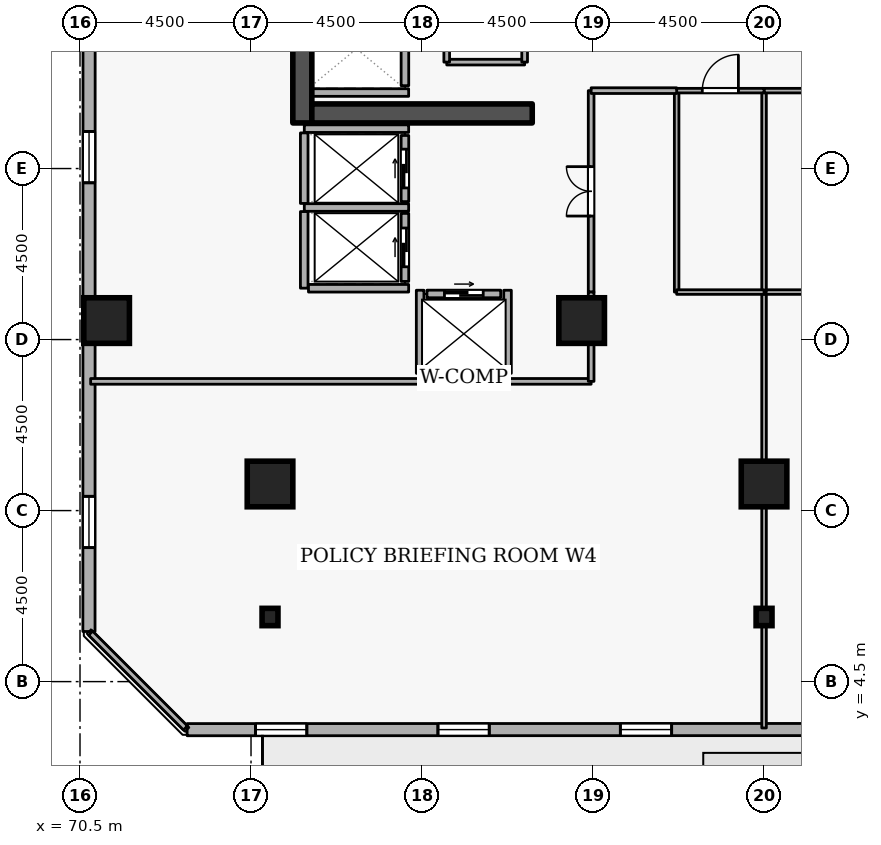
"""IFC4 building model, lengths in metres.
Left out: names, types, materials, properties, quantities, classifications, styles, units other than length and angle.
Written with IfcOpenShell. Run it as: python <this file> out.ifc"""

import sys

from ifc_helpers import new_model, si_unit, direction, frame, frame_2d, origin, origin_2d, place, context, subcontext, project, spatial, rectangle, i_section, extrude, element, fill, save


model = new_model("IFC4")
c1 = context("Model", 3, precision=1e-05, world=origin(), true_north=direction((0.0, 1.0)))
c2 = subcontext(c1, "Body", "Model", "MODEL_VIEW")
j1 = project(units=[si_unit("LENGTHUNIT", "METRE"), si_unit("PLANEANGLEUNIT", "RADIAN")], contexts=[c1])
p1 = place(None, origin())
s1 = spatial("IfcSite", under=j1, at=p1, CompositionType="ELEMENT")
p2 = place(p1, origin())
s2 = spatial("IfcBuilding", under=s1, at=p2, CompositionType="ELEMENT")
p3 = place(p2, frame((0.0, 0.0, 137.7)))
s3 = spatial("IfcBuildingStorey", under=s2, at=p3, CompositionType="ELEMENT", Elevation=137.7)
p4 = place(p3, frame((76.35, 19.2, 0.0), z_axis=(0.0, 0.0, 1.0), x_axis=(0.0, 1.0, 0.0)))
e1 = element("IfcWall", 1, at=p4, inside=s3, PredefinedType="SHEAR", context=c2, shape_type="SweptSolid", body=[
    extrude(rectangle(XDim=15.6, YDim=0.5, at=frame_2d((7.8, 0.0))), origin(), (0.0, 0.0, 1.0), 3.6),
])
p5 = place(p3, frame((76.6, 19.45, 0.0), z_axis=(0.0, 0.0, 1.0), x_axis=(1.0, 0.0, 0.0)))
e2 = element("IfcWall", 2, at=p5, inside=s3, PredefinedType="SHEAR", context=c2, shape_type="SweptSolid", body=[
    extrude(rectangle(XDim=5.8, YDim=0.5, at=frame_2d((2.9, 0.0))), origin(), (0.0, 0.0, 1.0), 3.6),
])
for number, where, z_axis, x_axis in (
    (3, (71.2, 14.0, 0.0), (0.0, 0.0, 1.0), (1.0, 0.0, 0.0)),
    (4, (88.5, 9.7, 0.0), (0.0, 0.0, 1.0), (1.0, 0.0, 0.0)),
    (5, (75.5, 9.7, 0.0), (0.0, 0.0, 1.0), (1.0, 0.0, 0.0)),
    (6, (83.7, 14.0, 0.0), (0.0, 0.0, 1.0), (1.0, 0.0, 0.0)),
):
    element("IfcColumn", number, at=place(p3, frame(where, z_axis=z_axis, x_axis=x_axis)), inside=s3, PredefinedType="COLUMN", context=c2, shape_type="SweptSolid", body=[
        extrude(rectangle(XDim=1.2, YDim=1.2, at=origin_2d()), origin(), (0.0, 0.0, 1.0), 3.6),
    ])
for number, where, z_axis, x_axis in (
    (7, (88.5, 6.2, 0.0), (0.0, 0.0, 1.0), (1.0, 0.0, 0.0)),
    (8, (75.5, 6.2, 0.0), (0.0, 0.0, 1.0), (1.0, 0.0, 0.0)),
):
    element("IfcColumn", number, at=place(p3, frame(where, z_axis=z_axis, x_axis=x_axis)), inside=s3, PredefinedType="COLUMN", context=c2, shape_type="SweptSolid", body=[
        extrude(i_section(OverallWidth=0.418, OverallDepth=0.456, WebThickness=0.042, FlangeThickness=0.067, FilletRadius=0.015, at=origin_2d()), origin(), (0.0, 0.0, 1.0), 3.6),
    ])
p6 = place(p3, frame((73.319, 3.235, 0.0), z_axis=(0.0, 0.0, 1.0), x_axis=(0.99999997701, 0.000214431216, 0.0)))
e9 = element("IfcWall", 9, at=p6, inside=s3, PredefinedType="STANDARD", context=c2, shape_type="SweptSolid", body=[
    extrude(rectangle(XDim=34.156, YDim=0.32, at=frame_2d((17.078, 0.0))), origin(), (0.0, 0.0, 1.0), 2.66),
])
p7 = place(p6, frame((18.878, 0.0, 0.0)))
e10 = element("IfcOpeningElement", 10, at=p7, cuts=e9, PredefinedType="OPENING", context=c2, shape_type="SweptSolid", body=[
    extrude(rectangle(XDim=1.0, YDim=2.08, at=frame_2d((0.5, 1.04))), frame((0.0, 0.17, 0.0), z_axis=(0.0, -1.0, 0.0), x_axis=(1.0, 0.0, 0.0)), (0.0, 0.0, 1.0), 0.34),
])
p8 = place(p6, frame((1.8, 0.0, 0.72)))
e11 = element("IfcOpeningElement", 11, at=p8, cuts=e9, PredefinedType="OPENING", context=c2, shape_type="SweptSolid", body=[
    extrude(rectangle(XDim=1.35, YDim=1.05, at=frame_2d((0.675, 0.525))), frame((0.0, 0.17, 0.0), z_axis=(0.0, -1.0, 0.0), x_axis=(1.0, 0.0, 0.0)), (0.0, 0.0, 1.0), 0.34),
])
p9 = place(p6, frame((6.6, 0.0, 0.72)))
e12 = element("IfcOpeningElement", 12, at=p9, cuts=e9, PredefinedType="OPENING", context=c2, shape_type="SweptSolid", body=[
    extrude(rectangle(XDim=1.35, YDim=1.05, at=frame_2d((0.675, 0.525))), frame((0.0, 0.17, 0.0), z_axis=(0.0, -1.0, 0.0), x_axis=(1.0, 0.0, 0.0)), (0.0, 0.0, 1.0), 0.34),
])
p10 = place(p6, frame((11.4, 0.0, 0.72)))
e13 = element("IfcOpeningElement", 13, at=p10, cuts=e9, PredefinedType="OPENING", context=c2, shape_type="SweptSolid", body=[
    extrude(rectangle(XDim=1.35, YDim=1.05, at=frame_2d((0.675, 0.525))), frame((0.0, 0.17, 0.0), z_axis=(0.0, -1.0, 0.0), x_axis=(1.0, 0.0, 0.0)), (0.0, 0.0, 1.0), 0.34),
])
p11 = place(p6, frame((16.2, 0.0, 0.72)))
e14 = element("IfcOpeningElement", 14, at=p11, cuts=e9, PredefinedType="OPENING", context=c2, shape_type="SweptSolid", body=[
    extrude(rectangle(XDim=1.35, YDim=1.05, at=frame_2d((0.675, 0.525))), frame((0.0, 0.17, 0.0), z_axis=(0.0, -1.0, 0.0), x_axis=(1.0, 0.0, 0.0)), (0.0, 0.0, 1.0), 0.34),
])
p12 = place(p6, frame((21.0, 0.0, 0.72)))
e15 = element("IfcOpeningElement", 15, at=p12, cuts=e9, PredefinedType="OPENING", context=c2, shape_type="SweptSolid", body=[
    extrude(rectangle(XDim=1.35, YDim=1.05, at=frame_2d((0.675, 0.525))), frame((0.0, 0.17, 0.0), z_axis=(0.0, -1.0, 0.0), x_axis=(1.0, 0.0, 0.0)), (0.0, 0.0, 1.0), 0.34),
])
p13 = place(p6, frame((25.8, 0.0, 0.72)))
e16 = element("IfcOpeningElement", 16, at=p13, cuts=e9, PredefinedType="OPENING", context=c2, shape_type="SweptSolid", body=[
    extrude(rectangle(XDim=1.35, YDim=1.05, at=frame_2d((0.675, 0.525))), frame((0.0, 0.17, 0.0), z_axis=(0.0, -1.0, 0.0), x_axis=(1.0, 0.0, 0.0)), (0.0, 0.0, 1.0), 0.34),
])
p14 = place(p6, frame((30.6, 0.0, 0.72)))
e17 = element("IfcOpeningElement", 17, at=p14, cuts=e9, PredefinedType="OPENING", context=c2, shape_type="SweptSolid", body=[
    extrude(rectangle(XDim=1.35, YDim=1.05, at=frame_2d((0.675, 0.525))), frame((0.0, 0.17, 0.0), z_axis=(0.0, -1.0, 0.0), x_axis=(1.0, 0.0, 0.0)), (0.0, 0.0, 1.0), 0.34),
])
p15 = place(p3, frame((70.743, 39.975, 0.0), z_axis=(0.0, 0.0, 1.0), x_axis=(-0.000214431216, -0.99999997701, 0.0)))
e18 = element("IfcWall", 18, at=p15, inside=s3, PredefinedType="STANDARD", context=c2, shape_type="SweptSolid", body=[
    extrude(rectangle(XDim=34.156, YDim=0.32, at=frame_2d((17.078, 0.0))), origin(), (0.0, 0.0, 1.0), 2.66),
])
p16 = place(p15, frame((6.6, 0.0, 0.72)))
e19 = element("IfcOpeningElement", 19, at=p16, cuts=e18, PredefinedType="OPENING", context=c2, shape_type="SweptSolid", body=[
    extrude(rectangle(XDim=1.35, YDim=1.05, at=frame_2d((0.675, 0.525))), frame((0.0, 0.17, 0.0), z_axis=(0.0, -1.0, 0.0), x_axis=(1.0, 0.0, 0.0)), (0.0, 0.0, 1.0), 0.34),
])
p17 = place(p15, frame((21.0, 0.0, 0.72)))
e20 = element("IfcOpeningElement", 20, at=p17, cuts=e18, PredefinedType="OPENING", context=c2, shape_type="SweptSolid", body=[
    extrude(rectangle(XDim=1.35, YDim=1.05, at=frame_2d((0.675, 0.525))), frame((0.0, 0.17, 0.0), z_axis=(0.0, -1.0, 0.0), x_axis=(1.0, 0.0, 0.0)), (0.0, 0.0, 1.0), 0.34),
])
p18 = place(p15, frame((30.6, 0.0, 0.72)))
e21 = element("IfcOpeningElement", 21, at=p18, cuts=e18, PredefinedType="OPENING", context=c2, shape_type="SweptSolid", body=[
    extrude(rectangle(XDim=1.35, YDim=1.05, at=frame_2d((0.675, 0.525))), frame((0.0, 0.17, 0.0), z_axis=(0.0, -1.0, 0.0), x_axis=(1.0, 0.0, 0.0)), (0.0, 0.0, 1.0), 0.34),
])
p19 = place(p3, frame((79.05, 20.18, 0.0), z_axis=(0.0, 0.0, 1.0), x_axis=(0.0, 1.0, 0.0)))
e22 = element("IfcWall", 22, at=p19, inside=s3, PredefinedType="STANDARD", context=c2, shape_type="SweptSolid", body=[
    extrude(rectangle(XDim=1.94, YDim=0.2, at=frame_2d((0.97, 0.0))), origin(), (0.0, 0.0, 1.0), 3.26),
])
p20 = place(p3, frame((79.05, 17.13, 0.0), z_axis=(0.0, 0.0, 1.0), x_axis=(0.0, 1.0, 0.0)))
e23 = element("IfcWall", 23, at=p20, inside=s3, PredefinedType="STANDARD", context=c2, shape_type="SweptSolid", body=[
    extrude(rectangle(XDim=1.74, YDim=0.2, at=frame_2d((0.87, 0.0))), origin(), (0.0, 0.0, 1.0), 3.26),
])
p21 = place(p20, frame((0.36, 0.0, 0.0)))
e24 = element("IfcOpeningElement", 24, at=p21, cuts=e23, PredefinedType="OPENING", context=c2, shape_type="SweptSolid", body=[
    extrude(rectangle(XDim=1.02, YDim=2.06, at=frame_2d((0.51, 1.03))), frame((0.0, 0.11, 0.0), z_axis=(0.0, -1.0, 0.0), x_axis=(1.0, 0.0, 0.0)), (0.0, 0.0, 1.0), 0.22),
])
p22 = place(p3, frame((79.05, 15.03, 0.0), z_axis=(0.0, 0.0, 1.0), x_axis=(0.0, 1.0, 0.0)))
e25 = element("IfcWall", 25, at=p22, inside=s3, PredefinedType="STANDARD", context=c2, shape_type="SweptSolid", body=[
    extrude(rectangle(XDim=1.79, YDim=0.2, at=frame_2d((0.895, 0.0))), origin(), (0.0, 0.0, 1.0), 3.26),
])
p23 = place(p22, frame((0.385, 0.0, 0.0)))
e26 = element("IfcOpeningElement", 26, at=p23, cuts=e25, PredefinedType="OPENING", context=c2, shape_type="SweptSolid", body=[
    extrude(rectangle(XDim=1.02, YDim=2.06, at=frame_2d((0.51, 1.03))), frame((0.0, 0.11, 0.0), z_axis=(0.0, -1.0, 0.0), x_axis=(1.0, 0.0, 0.0)), (0.0, 0.0, 1.0), 0.22),
])
p24 = place(p3, frame((79.63, 14.7, 0.0), z_axis=(0.0, 0.0, 1.0), x_axis=(1.0, 0.0, 0.0)))
e27 = element("IfcWall", 27, at=p24, inside=s3, PredefinedType="STANDARD", context=c2, shape_type="SweptSolid", body=[
    extrude(rectangle(XDim=1.94, YDim=0.2, at=frame_2d((0.97, 0.0))), origin(), (0.0, 0.0, 1.0), 3.26),
])
p25 = place(p24, frame((0.46, 0.0, 0.0)))
e28 = element("IfcOpeningElement", 28, at=p25, cuts=e27, PredefinedType="OPENING", context=c2, shape_type="SweptSolid", body=[
    extrude(rectangle(XDim=1.02, YDim=2.06, at=frame_2d((0.51, 1.03))), frame((0.0, 0.11, 0.0), z_axis=(0.0, -1.0, 0.0), x_axis=(1.0, 0.0, 0.0)), (0.0, 0.0, 1.0), 0.22),
])
p26 = place(p3, frame((76.612, 20.0, 0.0), z_axis=(0.0, 0.0, 1.0), x_axis=(1.0, 0.0, 0.0)))
e29 = element("IfcWall", 29, at=p26, inside=s3, PredefinedType="STANDARD", context=c2, shape_type="SweptSolid", body=[
    extrude(rectangle(XDim=2.536, YDim=0.2, at=frame_2d((1.268, 0.0))), origin(), (0.0, 0.0, 1.0), 3.26),
])
p27 = place(p3, frame((76.402, 19.05, 0.0), z_axis=(0.0, 0.0, 1.0), x_axis=(1.0, 0.0, 0.0)))
e30 = element("IfcWall", 30, at=p27, inside=s3, PredefinedType="STANDARD", context=c2, shape_type="SweptSolid", body=[
    extrude(rectangle(XDim=2.746, YDim=0.2, at=frame_2d((1.373, 0.0))), origin(), (0.0, 0.0, 1.0), 2.465),
])
p28 = place(p3, frame((76.402, 16.975, 0.0), z_axis=(0.0, 0.0, 1.0), x_axis=(1.0, 0.0, 0.0)))
e31 = element("IfcWall", 31, at=p28, inside=s3, PredefinedType="STANDARD", context=c2, shape_type="SweptSolid", body=[
    extrude(rectangle(XDim=2.746, YDim=0.2, at=frame_2d((1.373, 0.0))), origin(), (0.0, 0.0, 1.0), 3.26),
])
p29 = place(p3, frame((76.4, 14.852, 0.0), z_axis=(0.0, 0.0, 1.0), x_axis=(0.0, 1.0, 0.0)))
e32 = element("IfcWall", 32, at=p29, inside=s3, PredefinedType="STANDARD", context=c2, shape_type="SweptSolid", body=[
    extrude(rectangle(XDim=2.016, YDim=0.2, at=frame_2d((1.008, 0.0))), origin(), (0.0, 0.0, 1.0), 3.26),
])
p30 = place(p3, frame((76.4, 17.082, 0.0), z_axis=(0.0, 0.0, 1.0), x_axis=(0.0, 1.0, 0.0)))
e33 = element("IfcWall", 33, at=p30, inside=s3, PredefinedType="STANDARD", context=c2, shape_type="SweptSolid", body=[
    extrude(rectangle(XDim=1.856, YDim=0.2, at=frame_2d((0.928, 0.0))), origin(), (0.0, 0.0, 1.0), 3.26),
])
p31 = place(p3, frame((76.512, 14.85, 0.0), z_axis=(0.0, 0.0, 1.0), x_axis=(1.0, 0.0, 0.0)))
e34 = element("IfcWall", 34, at=p31, inside=s3, PredefinedType="STANDARD", context=c2, shape_type="SweptSolid", body=[
    extrude(rectangle(XDim=2.636, YDim=0.2, at=frame_2d((1.318, 0.0))), origin(), (0.0, 0.0, 1.0), 3.26),
])
p32 = place(p3, frame((79.452, 12.5, 0.0), z_axis=(0.0, 0.0, 1.0), x_axis=(1.0, 0.0, 0.0)))
e35 = element("IfcWall", 35, at=p32, inside=s3, PredefinedType="STANDARD", context=c2, shape_type="SweptSolid", body=[
    extrude(rectangle(XDim=2.296, YDim=0.2, at=frame_2d((1.148, 0.0))), origin(), (0.0, 0.0, 1.0), 3.26),
])
for number, where, z_axis, x_axis in (
    (36, (81.75, 12.612, 0.0), (0.0, 0.0, 1.0), (0.0, 1.0, 0.0)),
    (37, (79.45, 12.612, 0.0), (0.0, 0.0, 1.0), (0.0, 1.0, 0.0)),
):
    element("IfcWall", number, at=place(p3, frame(where, z_axis=z_axis, x_axis=x_axis)), inside=s3, PredefinedType="STANDARD", context=c2, shape_type="SweptSolid", body=[
        extrude(rectangle(XDim=2.186, YDim=0.2, at=frame_2d((1.093, 0.0))), origin(), (0.0, 0.0, 1.0), 3.26),
    ])
p33 = place(p3, frame((82.2, 20.8, 0.0), z_axis=(0.0, 0.0, 1.0), x_axis=(-1.0, 0.0, 0.0)))
e38 = element("IfcWall", 38, at=p33, inside=s3, PredefinedType="PARTITIONING", context=c2, shape_type="SweptSolid", body=[
    extrude(rectangle(XDim=2.05, YDim=0.15, at=frame_2d((1.025, 0.0))), origin(), (0.0, 0.0, 1.0), 3.26),
])
p34 = place(p3, frame((80.15, 20.8, 0.0), z_axis=(0.0, 0.0, 1.0), x_axis=(0.0, 1.0, 0.0)))
e39 = element("IfcWall", 39, at=p34, inside=s3, PredefinedType="PARTITIONING", context=c2, shape_type="SweptSolid", body=[
    extrude(rectangle(XDim=3.25, YDim=0.15, at=frame_2d((1.625, 0.0))), origin(), (0.0, 0.0, 1.0), 3.26),
])
p35 = place(p3, frame((82.2, 24.05, 0.0), z_axis=(0.0, 0.0, 1.0), x_axis=(0.0, -1.0, 0.0)))
e40 = element("IfcWall", 40, at=p35, inside=s3, PredefinedType="PARTITIONING", context=c2, shape_type="SweptSolid", body=[
    extrude(rectangle(XDim=3.25, YDim=0.15, at=frame_2d((1.625, 0.0))), origin(), (0.0, 0.0, 1.0), 3.26),
])
p36 = place(p35, frame((1.165, 0.0, 0.0)))
e41 = element("IfcOpeningElement", 41, at=p36, cuts=e40, PredefinedType="OPENING", context=c2, shape_type="SweptSolid", body=[
    extrude(rectangle(XDim=0.92, YDim=2.08, at=frame_2d((0.46, 1.04))), frame((0.0, 0.085, 0.0), z_axis=(0.0, -1.0, 0.0), x_axis=(1.0, 0.0, 0.0)), (0.0, 0.0, 1.0), 0.17),
])
p37 = place(p3, frame((88.5, 3.28, 0.0), z_axis=(0.0, 0.0, 1.0), x_axis=(0.0, 1.0, 0.0)))
e42 = element("IfcWall", 42, at=p37, inside=s3, PredefinedType="PARTITIONING", context=c2, shape_type="SweptSolid", body=[
    extrude(rectangle(XDim=11.47, YDim=0.12, at=frame_2d((5.735, 0.0))), origin(), (0.0, 0.0, 1.0), 2.802),
])
p38 = place(p3, frame((88.5, 14.75, 0.0), z_axis=(0.0, 0.0, 1.0), x_axis=(1.0, 0.0, 0.0)))
e43 = element("IfcWall", 43, at=p38, inside=s3, PredefinedType="PARTITIONING", context=c2, shape_type="SweptSolid", body=[
    extrude(rectangle(XDim=4.55, YDim=0.12, at=frame_2d((2.275, 0.0))), origin(), (0.0, 0.0, 1.0), 3.26),
])
p39 = place(p3, frame((88.5, 14.75, 0.0), z_axis=(0.0, 0.0, 1.0), x_axis=(0.0, 1.0, 0.0)))
e44 = element("IfcWall", 44, at=p39, inside=s3, PredefinedType="PARTITIONING", context=c2, shape_type="SweptSolid", body=[
    extrude(rectangle(XDim=5.3, YDim=0.12, at=frame_2d((2.65, 0.0))), origin(), (0.0, 0.0, 1.0), 3.26),
])
p40 = place(p3, frame((88.5, 20.05, 0.0), z_axis=(0.0, 0.0, 1.0), x_axis=(1.0, 0.0, 0.0)))
e45 = element("IfcWall", 45, at=p40, inside=s3, PredefinedType="PARTITIONING", context=c2, shape_type="SweptSolid", body=[
    extrude(rectangle(XDim=4.55, YDim=0.12, at=frame_2d((2.275, 0.0))), origin(), (0.0, 0.0, 1.0), 3.26),
])
p41 = place(p3, frame((86.2, 14.75, 0.0), z_axis=(0.0, 0.0, 1.0), x_axis=(0.0, 1.0, 0.0)))
e46 = element("IfcWall", 46, at=p41, inside=s3, PredefinedType="PARTITIONING", context=c2, shape_type="SweptSolid", body=[
    extrude(rectangle(XDim=5.3, YDim=0.12, at=frame_2d((2.65, 0.0))), origin(), (0.0, 0.0, 1.0), 3.26),
])
p42 = place(p3, frame((86.2, 20.05, 0.0), z_axis=(0.0, 0.0, 1.0), x_axis=(1.0, 0.0, 0.0)))
e47 = element("IfcWall", 47, at=p42, inside=s3, PredefinedType="PARTITIONING", context=c2, shape_type="SweptSolid", body=[
    extrude(rectangle(XDim=2.3, YDim=0.12, at=frame_2d((1.15, 0.0))), origin(), (0.0, 0.0, 1.0), 3.26),
])
p43 = place(p42, frame((0.675, 0.0, 0.0)))
e48 = element("IfcOpeningElement", 48, at=p43, cuts=e47, PredefinedType="OPENING", context=c2, shape_type="SweptSolid", body=[
    extrude(rectangle(XDim=0.95, YDim=2.1, at=frame_2d((0.475, 1.05))), frame((0.0, 0.07, 0.0), z_axis=(0.0, -1.0, 0.0), x_axis=(1.0, 0.0, 0.0)), (0.0, 0.0, 1.0), 0.14),
])
p44 = place(p3, frame((88.5, 14.75, 0.0), z_axis=(0.0, 0.0, 1.0), x_axis=(-1.0, 0.0, 0.0)))
e49 = element("IfcWall", 49, at=p44, inside=s3, PredefinedType="PARTITIONING", context=c2, shape_type="SweptSolid", body=[
    extrude(rectangle(XDim=2.3, YDim=0.12, at=frame_2d((1.15, 0.0))), origin(), (0.0, 0.0, 1.0), 3.26),
])
p45 = place(p3, frame((83.95, 14.75, 0.0), z_axis=(0.0, 0.0, 1.0), x_axis=(0.0, 1.0, 0.0)))
e50 = element("IfcWall", 50, at=p45, inside=s3, PredefinedType="PARTITIONING", context=c2, shape_type="SweptSolid", body=[
    extrude(rectangle(XDim=5.3, YDim=0.15, at=frame_2d((2.65, 0.0))), origin(), (0.0, 0.0, 1.0), 3.26),
])
p46 = place(p45, frame((2.0, 0.0, 0.0)))
e51 = element("IfcOpeningElement", 51, at=p46, cuts=e50, PredefinedType="OPENING", context=c2, shape_type="SweptSolid", body=[
    extrude(rectangle(XDim=1.3, YDim=2.12, at=frame_2d((0.65, 1.06))), frame((0.0, 0.085, 0.0), z_axis=(0.0, -1.0, 0.0), x_axis=(1.0, 0.0, 0.0)), (0.0, 0.0, 1.0), 0.17),
])
p47 = place(p3, frame((83.95, 20.05, 0.0), z_axis=(0.0, 0.0, 1.0), x_axis=(1.0, 0.0, 0.0)))
e52 = element("IfcWall", 52, at=p47, inside=s3, PredefinedType="PARTITIONING", context=c2, shape_type="SweptSolid", body=[
    extrude(rectangle(XDim=2.25, YDim=0.15, at=frame_2d((1.125, 0.0))), origin(), (0.0, 0.0, 1.0), 3.26),
])
p48 = place(p3, frame((73.275, 3.28, 0.0), z_axis=(0.0, 0.0, 1.0), x_axis=(-0.707106781187, 0.707106781187, 0.0)))
e53 = element("IfcWall", 53, at=p48, inside=s3, PredefinedType="PARTITIONING", context=c2, shape_type="SweptSolid", body=[
    extrude(rectangle(XDim=3.528, YDim=0.15, at=frame_2d((1.764, 0.0))), origin(), (0.0, 0.0, 1.0), 3.26),
])
p49 = place(p3, frame((70.78, 12.4, 0.0), z_axis=(0.0, 0.0, 1.0), x_axis=(1.0, 0.0, 0.0)))
e54 = element("IfcWall", 54, at=p49, inside=s3, PredefinedType="PARTITIONING", context=c2, shape_type="SweptSolid", body=[
    extrude(rectangle(XDim=8.672, YDim=0.15, at=frame_2d((4.336, 0.0))), origin(), (0.0, 0.0, 1.0), 3.26),
])
p50 = place(p3, frame((81.748, 12.4, 0.0), z_axis=(0.0, 0.0, 1.0), x_axis=(1.0, 0.0, 0.0)))
e55 = element("IfcWall", 55, at=p50, inside=s3, PredefinedType="PARTITIONING", context=c2, shape_type="SweptSolid", body=[
    extrude(rectangle(XDim=2.202, YDim=0.15, at=frame_2d((1.101, 0.0))), origin(), (0.0, 0.0, 1.0), 3.26),
])
p51 = place(p3, frame((83.95, 12.4, 0.0), z_axis=(0.0, 0.0, 1.0), x_axis=(0.0, 1.0, 0.0)))
e56 = element("IfcWall", 56, at=p51, inside=s3, PredefinedType="PARTITIONING", context=c2, shape_type="SweptSolid", body=[
    extrude(rectangle(XDim=2.35, YDim=0.15, at=frame_2d((1.175, 0.0))), origin(), (0.0, 0.0, 1.0), 3.26),
])
p52 = place(p8, origin())
e57 = element("IfcWindow", 57, at=p52, inside=s3, PartitioningType="SINGLE_PANEL", PredefinedType="WINDOW", context=c2, shape_type="SweptSolid", body=[
    extrude(rectangle(XDim=1.35, YDim=1.05, at=frame_2d((0.675, 0.525))), frame((0.0, 0.03, 0.0), z_axis=(0.0, -1.0, 0.0), x_axis=(1.0, 0.0, 0.0)), (0.0, 0.0, 1.0), 0.06),
])
fill(e11, e57)
p53 = place(p9, origin())
e58 = element("IfcWindow", 58, at=p53, inside=s3, PartitioningType="SINGLE_PANEL", PredefinedType="WINDOW", context=c2, shape_type="SweptSolid", body=[
    extrude(rectangle(XDim=1.35, YDim=1.05, at=frame_2d((0.675, 0.525))), frame((0.0, 0.03, 0.0), z_axis=(0.0, -1.0, 0.0), x_axis=(1.0, 0.0, 0.0)), (0.0, 0.0, 1.0), 0.06),
])
fill(e12, e58)
p54 = place(p10, origin())
e59 = element("IfcWindow", 59, at=p54, inside=s3, PartitioningType="SINGLE_PANEL", PredefinedType="WINDOW", context=c2, shape_type="SweptSolid", body=[
    extrude(rectangle(XDim=1.35, YDim=1.05, at=frame_2d((0.675, 0.525))), frame((0.0, 0.03, 0.0), z_axis=(0.0, -1.0, 0.0), x_axis=(1.0, 0.0, 0.0)), (0.0, 0.0, 1.0), 0.06),
])
fill(e13, e59)
p55 = place(p17, origin())
e60 = element("IfcWindow", 60, at=p55, inside=s3, PartitioningType="SINGLE_PANEL", PredefinedType="WINDOW", context=c2, shape_type="SweptSolid", body=[
    extrude(rectangle(XDim=1.35, YDim=1.05, at=frame_2d((0.675, 0.525))), frame((0.0, 0.03, 0.0), z_axis=(0.0, -1.0, 0.0), x_axis=(1.0, 0.0, 0.0)), (0.0, 0.0, 1.0), 0.06),
])
fill(e20, e60)
p56 = place(p18, origin())
e61 = element("IfcWindow", 61, at=p56, inside=s3, PartitioningType="SINGLE_PANEL", PredefinedType="WINDOW", context=c2, shape_type="SweptSolid", body=[
    extrude(rectangle(XDim=1.35, YDim=1.05, at=frame_2d((0.675, 0.525))), frame((0.0, 0.03, 0.0), z_axis=(0.0, -1.0, 0.0), x_axis=(1.0, 0.0, 0.0)), (0.0, 0.0, 1.0), 0.06),
])
fill(e21, e61)
p57 = place(p21, origin())
e62 = element("IfcDoor", 62, at=p57, inside=s3, OperationType="SLIDING_TO_LEFT", PredefinedType="DOOR", context=c2, shape_type="SweptSolid", body=[
    extrude(rectangle(XDim=1.02, YDim=2.06, at=frame_2d((0.51, 1.03))), frame((0.0, 0.025, 0.0), z_axis=(0.0, -1.0, 0.0), x_axis=(1.0, 0.0, 0.0)), (0.0, 0.0, 1.0), 0.05),
])
fill(e24, e62)
p58 = place(p23, origin())
e63 = element("IfcDoor", 63, at=p58, inside=s3, OperationType="SLIDING_TO_LEFT", PredefinedType="DOOR", context=c2, shape_type="SweptSolid", body=[
    extrude(rectangle(XDim=1.02, YDim=2.06, at=frame_2d((0.51, 1.03))), frame((0.0, 0.025, 0.0), z_axis=(0.0, -1.0, 0.0), x_axis=(1.0, 0.0, 0.0)), (0.0, 0.0, 1.0), 0.05),
])
fill(e26, e63)
p59 = place(p25, origin())
e64 = element("IfcDoor", 64, at=p59, inside=s3, OperationType="SLIDING_TO_LEFT", PredefinedType="DOOR", context=c2, shape_type="SweptSolid", body=[
    extrude(rectangle(XDim=1.02, YDim=2.06, at=frame_2d((0.51, 1.03))), frame((0.0, 0.025, 0.0), z_axis=(0.0, -1.0, 0.0), x_axis=(1.0, 0.0, 0.0)), (0.0, 0.0, 1.0), 0.05),
])
fill(e28, e64)
p60 = place(p43, origin())
e65 = element("IfcDoor", 65, at=p60, inside=s3, OperationType="SINGLE_SWING_RIGHT", PredefinedType="DOOR", context=c2, shape_type="SweptSolid", body=[
    extrude(rectangle(XDim=0.95, YDim=2.1, at=frame_2d((0.475, 1.05))), frame((0.0, 0.025, 0.0), z_axis=(0.0, -1.0, 0.0), x_axis=(1.0, 0.0, 0.0)), (0.0, 0.0, 1.0), 0.05),
])
fill(e48, e65)
p61 = place(p46, origin())
e66 = element("IfcDoor", 66, at=p61, inside=s3, OperationType="DOUBLE_DOOR_SINGLE_SWING", PredefinedType="DOOR", context=c2, shape_type="SweptSolid", body=[
    extrude(rectangle(XDim=1.3, YDim=2.12, at=frame_2d((0.65, 1.06))), frame((0.0, 0.025, 0.0), z_axis=(0.0, -1.0, 0.0), x_axis=(1.0, 0.0, 0.0)), (0.0, 0.0, 1.0), 0.05),
])
fill(e51, e66)
save(model, sys.argv[1])
